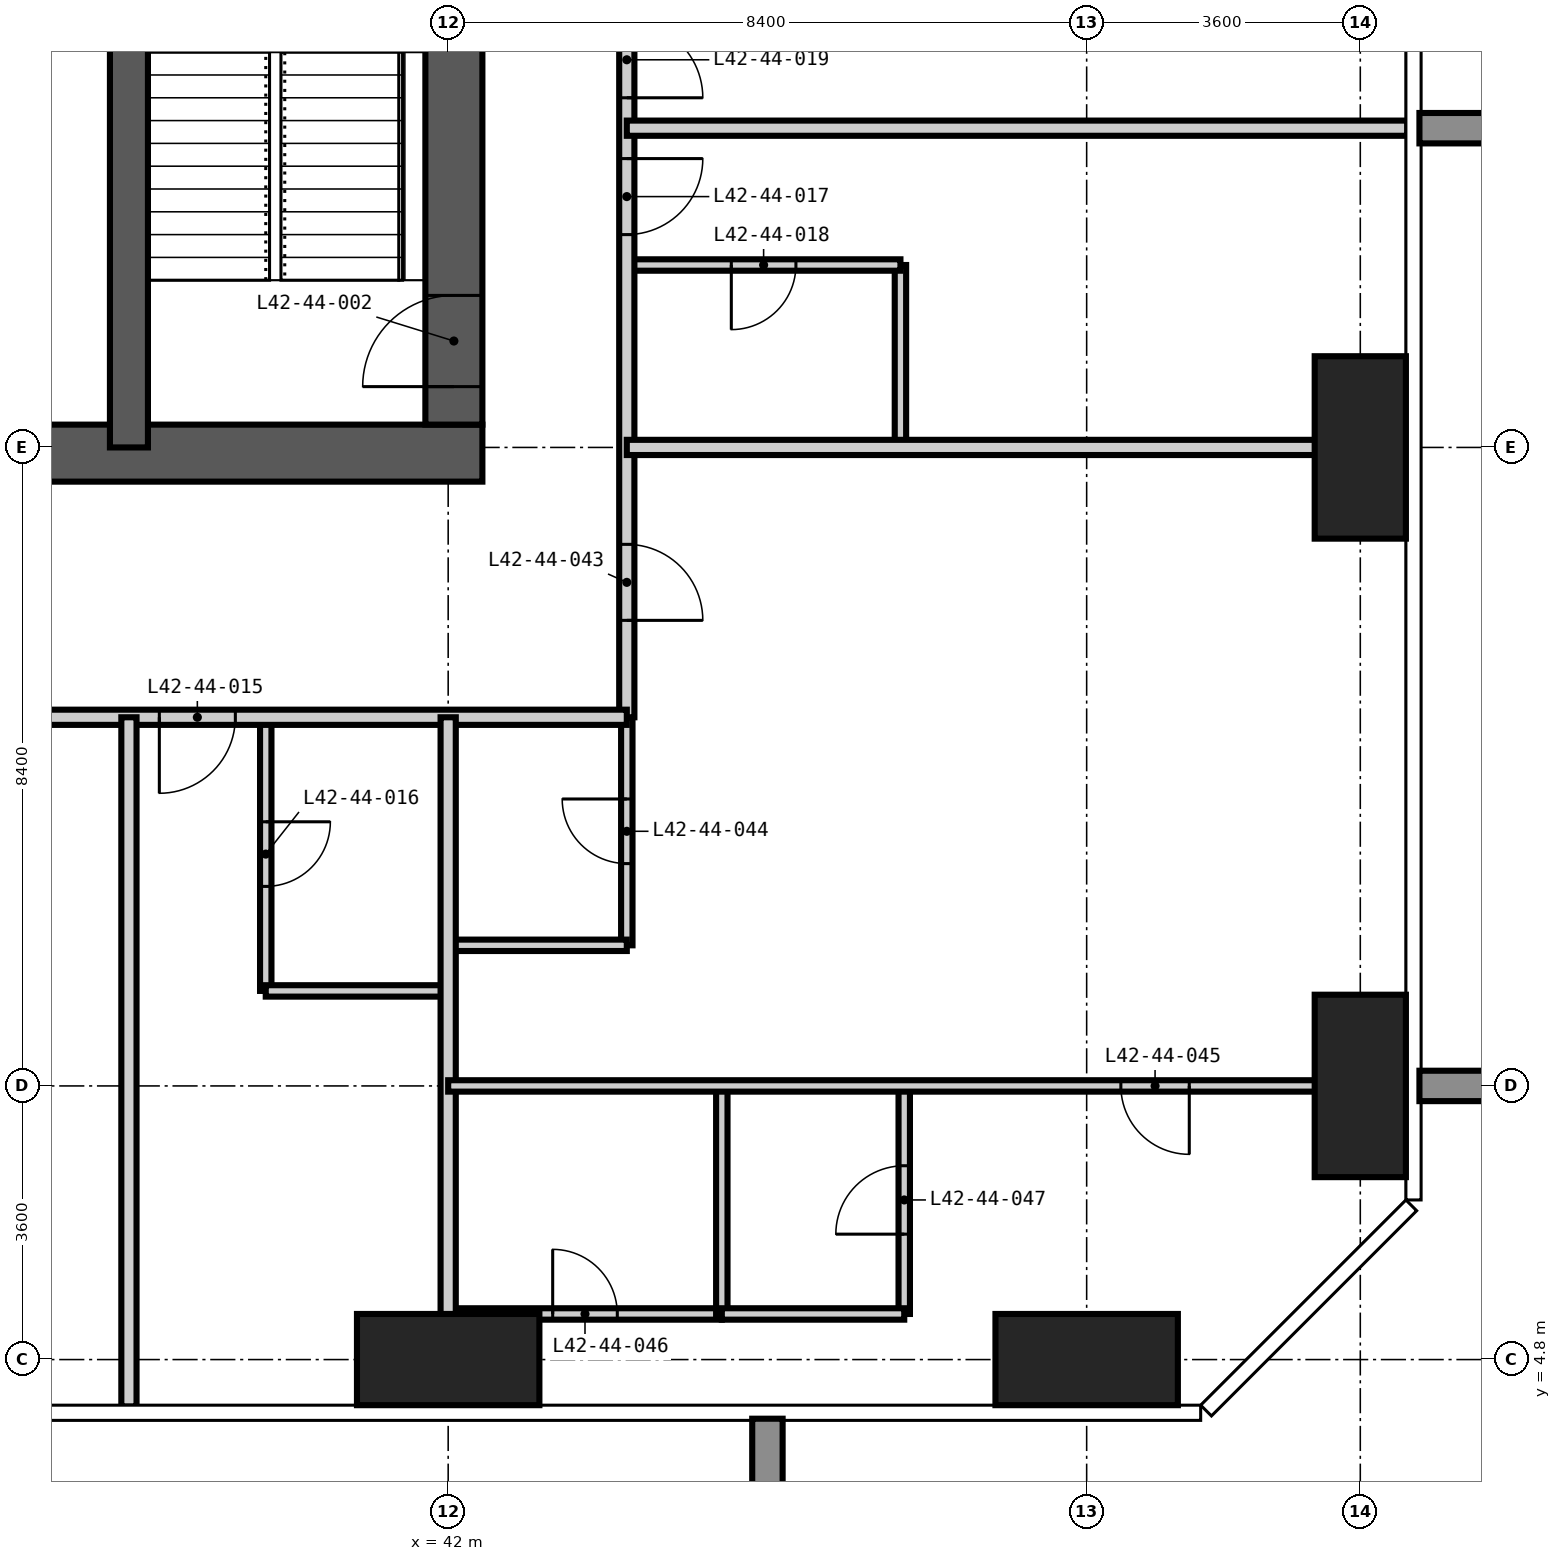
"""IFC4 building model, lengths in metres.
Left out: names, types, materials, properties, quantities, classifications, styles, units other than length and angle.
Written with IfcOpenShell. Run it as: python <this file> out.ifc"""

import sys

from ifc_helpers import new_model, si_unit, direction, frame, frame_2d, origin, origin_2d, place, context, subcontext, project, spatial, rectangle, extrude, element, fill, save


model = new_model("IFC4")
c1 = context("Model", 3, precision=1e-05, world=origin(), true_north=direction((0.0, 1.0)))
c2 = subcontext(c1, "Body", "Model", "MODEL_VIEW")
j1 = project(units=[si_unit("LENGTHUNIT", "METRE"), si_unit("PLANEANGLEUNIT", "RADIAN")], contexts=[c1])
p1 = place(None, origin())
s1 = spatial("IfcSite", under=j1, at=p1, CompositionType="ELEMENT")
p2 = place(p1, origin())
s2 = spatial("IfcBuilding", under=s1, at=p2, CompositionType="ELEMENT")
p3 = place(p2, frame((0.0, 0.0, 166.2)))
s3 = spatial("IfcBuildingStorey", under=s2, at=p3, CompositionType="ELEMENT", Elevation=166.2)
for number, where, z_axis, x_axis in (
    (1, (42.0, 4.8, -0.35), (0.0, 0.0, 1.0), (1.0, 0.0, 0.0)),
    (2, (50.4, 4.8, -0.35), (0.0, 0.0, 1.0), (1.0, 0.0, 0.0)),
):
    element("IfcColumn", number, at=place(p3, frame(where, z_axis=z_axis, x_axis=x_axis)), inside=s3, PredefinedType="COLUMN", context=c2, shape_type="SweptSolid", body=[
        extrude(rectangle(XDim=2.4, YDim=1.2, at=origin_2d()), origin(), (0.0, 0.0, 1.0), 3.6),
    ])
for number, where, z_axis, x_axis in (
    (3, (54.0, 8.4, -0.35), (0.0, 0.0, 1.0), (1.0, 0.0, 0.0)),
    (4, (54.0, 16.8, -0.35), (0.0, 0.0, 1.0), (1.0, 0.0, 0.0)),
):
    element("IfcColumn", number, at=place(p3, frame(where, z_axis=z_axis, x_axis=x_axis)), inside=s3, PredefinedType="COLUMN", context=c2, shape_type="SweptSolid", body=[
        extrude(rectangle(XDim=1.2, YDim=2.4, at=origin_2d()), origin(), (0.0, 0.0, 1.0), 3.6),
    ])
p4 = place(p3, frame((16.35, 16.725, -0.35), z_axis=(0.0, 0.0, 1.0), x_axis=(1.0, 0.0, 0.0)))
e5 = element("IfcWall", 5, at=p4, inside=s3, PredefinedType="SHEAR", context=c2, shape_type="SweptSolid", body=[
    extrude(rectangle(XDim=26.1, YDim=0.75, at=frame_2d((13.05, 0.0))), origin(), (0.0, 0.0, 1.0), 3.6),
])
p5 = place(p4, frame((12.55, 0.0, 0.35)))
e6 = element("IfcOpeningElement", 6, at=p5, cuts=e5, PredefinedType="OPENING", context=c2, shape_type="SweptSolid", body=[
    extrude(rectangle(XDim=1.0, YDim=2.1, at=frame_2d((0.5, 1.05))), frame((0.0, 0.385, 0.0), z_axis=(0.0, -1.0, 0.0), x_axis=(1.0, 0.0, 0.0)), (0.0, 0.0, 1.0), 0.77),
])
p6 = place(p4, frame((18.85, 0.0, 0.35)))
e7 = element("IfcOpeningElement", 7, at=p6, cuts=e5, PredefinedType="OPENING", context=c2, shape_type="SweptSolid", body=[
    extrude(rectangle(XDim=1.0, YDim=2.1, at=frame_2d((0.5, 1.05))), frame((0.0, 0.385, 0.0), z_axis=(0.0, -1.0, 0.0), x_axis=(1.0, 0.0, 0.0)), (0.0, 0.0, 1.0), 0.77),
])
p7 = place(p3, frame((42.075, 17.1, -0.35), z_axis=(0.0, 0.0, 1.0), x_axis=(0.0, 1.0, 0.0)))
e8 = element("IfcWall", 8, at=p7, inside=s3, PredefinedType="SHEAR", context=c2, shape_type="SweptSolid", body=[
    extrude(rectangle(XDim=24.6, YDim=0.75, at=frame_2d((12.3, 0.0))), origin(), (0.0, 0.0, 1.0), 3.6),
])
p8 = place(p7, frame((0.5, 0.0, 0.35)))
e9 = element("IfcOpeningElement", 9, at=p8, cuts=e8, PredefinedType="OPENING", context=c2, shape_type="SweptSolid", body=[
    extrude(rectangle(XDim=1.2, YDim=2.2, at=frame_2d((0.6, 1.1))), frame((0.0, 0.385, 0.0), z_axis=(0.0, -1.0, 0.0), x_axis=(1.0, 0.0, 0.0)), (0.0, 0.0, 1.0), 0.77),
])
p9 = place(p7, frame((11.8, 0.0, 0.35)))
e10 = element("IfcOpeningElement", 10, at=p9, cuts=e8, PredefinedType="OPENING", context=c2, shape_type="SweptSolid", body=[
    extrude(rectangle(XDim=1.0, YDim=2.1, at=frame_2d((0.5, 1.05))), frame((0.0, 0.385, 0.0), z_axis=(0.0, -1.0, 0.0), x_axis=(1.0, 0.0, 0.0)), (0.0, 0.0, 1.0), 0.77),
])
p10 = place(p7, frame((20.2, 0.0, 0.35)))
e11 = element("IfcOpeningElement", 11, at=p10, cuts=e8, PredefinedType="OPENING", context=c2, shape_type="SweptSolid", body=[
    extrude(rectangle(XDim=1.0, YDim=2.1, at=frame_2d((0.5, 1.05))), frame((0.0, 0.385, 0.0), z_axis=(0.0, -1.0, 0.0), x_axis=(1.0, 0.0, 0.0)), (0.0, 0.0, 1.0), 0.77),
])
p11 = place(p3, frame((37.8, 16.8, -0.35), z_axis=(0.0, 0.0, 1.0), x_axis=(0.0, 1.0, 0.0)))
e12 = element("IfcWall", 12, at=p11, inside=s3, PredefinedType="SHEAR", context=c2, shape_type="SweptSolid", body=[
    extrude(rectangle(XDim=11.2, YDim=0.5, at=frame_2d((5.6, 0.0))), origin(), (0.0, 0.0, 1.0), 3.6),
])
p12 = place(p3, frame((39.6, 9.65, 0.0), z_axis=(0.0, 0.0, 1.0), x_axis=(0.0, 1.0, 0.0)))
e13 = element("IfcWall", 13, at=p12, inside=s3, PredefinedType="PARTITIONING", context=c2, shape_type="SweptSolid", body=[
    extrude(rectangle(XDim=3.6, YDim=0.15, at=frame_2d((1.8, 0.0))), origin(), (0.0, 0.0, 1.0), 3.25),
])
p13 = place(p12, frame((1.375, 0.0, 0.0)))
e14 = element("IfcOpeningElement", 14, at=p13, cuts=e13, PredefinedType="OPENING", context=c2, shape_type="SweptSolid", body=[
    extrude(rectangle(XDim=0.85, YDim=2.1, at=frame_2d((0.425, 1.05))), frame((0.0, 0.085, 0.0), z_axis=(0.0, -1.0, 0.0), x_axis=(1.0, 0.0, 0.0)), (0.0, 0.0, 1.0), 0.17),
])
p14 = place(p3, frame((44.35, 10.25, 0.0), z_axis=(0.0, 0.0, 1.0), x_axis=(0.0, 1.0, 0.0)))
e15 = element("IfcWall", 15, at=p14, inside=s3, PredefinedType="PARTITIONING", context=c2, shape_type="SweptSolid", body=[
    extrude(rectangle(XDim=3.0, YDim=0.15, at=frame_2d((1.5, 0.0))), origin(), (0.0, 0.0, 1.0), 3.25),
])
p15 = place(p14, frame((1.075, 0.0, 0.0)))
e16 = element("IfcOpeningElement", 16, at=p15, cuts=e15, PredefinedType="OPENING", context=c2, shape_type="SweptSolid", body=[
    extrude(rectangle(XDim=0.85, YDim=2.1, at=frame_2d((0.425, 1.05))), frame((0.0, 0.085, 0.0), z_axis=(0.0, -1.0, 0.0), x_axis=(1.0, 0.0, 0.0)), (0.0, 0.0, 1.0), 0.17),
])
p16 = place(p3, frame((47.95, 16.8, 0.0), z_axis=(0.0, 0.0, 1.0), x_axis=(0.0, 1.0, 0.0)))
e17 = element("IfcWall", 17, at=p16, inside=s3, PredefinedType="PARTITIONING", context=c2, shape_type="SweptSolid", body=[
    extrude(rectangle(XDim=2.4, YDim=0.15, at=frame_2d((1.2, 0.0))), origin(), (0.0, 0.0, 1.0), 3.25),
])
p17 = place(p3, frame((42.0, 5.4, 0.0), z_axis=(0.0, 0.0, 1.0), x_axis=(1.0, 0.0, 0.0)))
e18 = element("IfcWall", 18, at=p17, inside=s3, PredefinedType="PARTITIONING", context=c2, shape_type="SweptSolid", body=[
    extrude(rectangle(XDim=3.6, YDim=0.15, at=frame_2d((1.8, 0.0))), origin(), (0.0, 0.0, 1.0), 3.25),
])
p18 = place(p17, frame((1.375, 0.0, 0.0)))
e19 = element("IfcOpeningElement", 19, at=p18, cuts=e18, PredefinedType="OPENING", context=c2, shape_type="SweptSolid", body=[
    extrude(rectangle(XDim=0.85, YDim=2.1, at=frame_2d((0.425, 1.05))), frame((0.0, 0.085, 0.0), z_axis=(0.0, -1.0, 0.0), x_axis=(1.0, 0.0, 0.0)), (0.0, 0.0, 1.0), 0.17),
])
p19 = place(p3, frame((39.6, 9.65, 0.0), z_axis=(0.0, 0.0, 1.0), x_axis=(1.0, 0.0, 0.0)))
e20 = element("IfcWall", 20, at=p19, inside=s3, PredefinedType="PARTITIONING", context=c2, shape_type="SweptSolid", body=[
    extrude(rectangle(XDim=2.4, YDim=0.15, at=frame_2d((1.2, 0.0))), origin(), (0.0, 0.0, 1.0), 3.25),
])
p20 = place(p3, frame((42.0, 10.25, 0.0), z_axis=(0.0, 0.0, 1.0), x_axis=(1.0, 0.0, 0.0)))
e21 = element("IfcWall", 21, at=p20, inside=s3, PredefinedType="PARTITIONING", context=c2, shape_type="SweptSolid", body=[
    extrude(rectangle(XDim=2.35, YDim=0.15, at=frame_2d((1.175, 0.0))), origin(), (0.0, 0.0, 1.0), 3.25),
])
p21 = place(p3, frame((44.35, 19.2, 0.0), z_axis=(0.0, 0.0, 1.0), x_axis=(1.0, 0.0, 0.0)))
e22 = element("IfcWall", 22, at=p21, inside=s3, PredefinedType="PARTITIONING", context=c2, shape_type="SweptSolid", body=[
    extrude(rectangle(XDim=3.6, YDim=0.15, at=frame_2d((1.8, 0.0))), origin(), (0.0, 0.0, 1.0), 3.25),
])
p22 = place(p21, frame((1.375, 0.0, 0.0)))
e23 = element("IfcOpeningElement", 23, at=p22, cuts=e22, PredefinedType="OPENING", context=c2, shape_type="SweptSolid", body=[
    extrude(rectangle(XDim=0.85, YDim=2.1, at=frame_2d((0.425, 1.05))), frame((0.0, 0.085, 0.0), z_axis=(0.0, -1.0, 0.0), x_axis=(1.0, 0.0, 0.0)), (0.0, 0.0, 1.0), 0.17),
])
p23 = place(p3, frame((44.35, 25.2, 0.0), z_axis=(0.0, 0.0, 1.0), x_axis=(0.0, -1.0, 0.0)))
e24 = element("IfcWall", 24, at=p23, inside=s3, PredefinedType="PARTITIONING", context=c2, shape_type="SweptSolid", body=[
    extrude(rectangle(XDim=11.95, YDim=0.2, at=frame_2d((5.975, 0.0))), origin(), (0.0, 0.0, 1.0), 3.25),
])
p24 = place(p23, frame((4.6, 0.0, 0.0)))
e25 = element("IfcOpeningElement", 25, at=p24, cuts=e24, PredefinedType="OPENING", context=c2, shape_type="SweptSolid", body=[
    extrude(rectangle(XDim=1.0, YDim=2.2, at=frame_2d((0.5, 1.1))), frame((0.0, 0.11, 0.0), z_axis=(0.0, -1.0, 0.0), x_axis=(1.0, 0.0, 0.0)), (0.0, 0.0, 1.0), 0.22),
])
p25 = place(p23, frame((2.8, 0.0, 0.0)))
e26 = element("IfcOpeningElement", 26, at=p25, cuts=e24, PredefinedType="OPENING", context=c2, shape_type="SweptSolid", body=[
    extrude(rectangle(XDim=1.0, YDim=2.2, at=frame_2d((0.5, 1.1))), frame((0.0, 0.11, 0.0), z_axis=(0.0, -1.0, 0.0), x_axis=(1.0, 0.0, 0.0)), (0.0, 0.0, 1.0), 0.22),
])
p26 = place(p23, frame((9.675, 0.0, 0.0)))
e27 = element("IfcOpeningElement", 27, at=p26, cuts=e24, PredefinedType="OPENING", context=c2, shape_type="SweptSolid", body=[
    extrude(rectangle(XDim=1.0, YDim=2.2, at=frame_2d((0.5, 1.1))), frame((0.0, 0.11, 0.0), z_axis=(0.0, -1.0, 0.0), x_axis=(1.0, 0.0, 0.0)), (0.0, 0.0, 1.0), 0.22),
])
p27 = place(p3, frame((44.35, 13.25, 0.0), z_axis=(0.0, 0.0, 1.0), x_axis=(-1.0, 0.0, 0.0)))
e28 = element("IfcWall", 28, at=p27, inside=s3, PredefinedType="PARTITIONING", context=c2, shape_type="SweptSolid", body=[
    extrude(rectangle(XDim=31.1, YDim=0.2, at=frame_2d((15.55, 0.0))), origin(), (0.0, 0.0, 1.0), 3.25),
])
p28 = place(p27, frame((23.75, 0.0, 0.0)))
e29 = element("IfcOpeningElement", 29, at=p28, cuts=e28, PredefinedType="OPENING", context=c2, shape_type="SweptSolid", body=[
    extrude(rectangle(XDim=1.0, YDim=2.2, at=frame_2d((0.5, 1.1))), frame((0.0, 0.11, 0.0), z_axis=(0.0, -1.0, 0.0), x_axis=(1.0, 0.0, 0.0)), (0.0, 0.0, 1.0), 0.22),
])
p29 = place(p27, frame((20.0, 0.0, 0.0)))
e30 = element("IfcOpeningElement", 30, at=p29, cuts=e28, PredefinedType="OPENING", context=c2, shape_type="SweptSolid", body=[
    extrude(rectangle(XDim=1.0, YDim=2.2, at=frame_2d((0.5, 1.1))), frame((0.0, 0.11, 0.0), z_axis=(0.0, -1.0, 0.0), x_axis=(1.0, 0.0, 0.0)), (0.0, 0.0, 1.0), 0.22),
])
p30 = place(p27, frame((8.9, 0.0, 0.0)))
e31 = element("IfcOpeningElement", 31, at=p30, cuts=e28, PredefinedType="OPENING", context=c2, shape_type="SweptSolid", body=[
    extrude(rectangle(XDim=1.0, YDim=2.2, at=frame_2d((0.5, 1.1))), frame((0.0, 0.11, 0.0), z_axis=(0.0, -1.0, 0.0), x_axis=(1.0, 0.0, 0.0)), (0.0, 0.0, 1.0), 0.22),
])
p31 = place(p27, frame((5.15, 0.0, 0.0)))
e32 = element("IfcOpeningElement", 32, at=p31, cuts=e28, PredefinedType="OPENING", context=c2, shape_type="SweptSolid", body=[
    extrude(rectangle(XDim=1.0, YDim=2.2, at=frame_2d((0.5, 1.1))), frame((0.0, 0.11, 0.0), z_axis=(0.0, -1.0, 0.0), x_axis=(1.0, 0.0, 0.0)), (0.0, 0.0, 1.0), 0.22),
])
for number, where, z_axis, x_axis in (
    (33, (37.8, 4.182, 0.0), (0.0, 0.0, 1.0), (0.0, 1.0, 0.0)),
    (34, (42.0, 4.182, 0.0), (0.0, 0.0, 1.0), (0.0, 1.0, 0.0)),
):
    element("IfcWall", number, at=place(p3, frame(where, z_axis=z_axis, x_axis=x_axis)), inside=s3, PredefinedType="PARTITIONING", context=c2, shape_type="SweptSolid", body=[
        extrude(rectangle(XDim=9.068, YDim=0.2, at=frame_2d((4.534, 0.0))), origin(), (0.0, 0.0, 1.0), 3.25),
    ])
for number, where, z_axis, x_axis in (
    (35, (44.35, 16.8, 0.0), (0.0, 0.0, 1.0), (1.0, 0.0, 0.0)),
    (36, (44.35, 21.0, 0.0), (0.0, 0.0, 1.0), (1.0, 0.0, 0.0)),
):
    element("IfcWall", number, at=place(p3, frame(where, z_axis=z_axis, x_axis=x_axis)), inside=s3, PredefinedType="PARTITIONING", context=c2, shape_type="SweptSolid", body=[
        extrude(rectangle(XDim=10.268, YDim=0.2, at=frame_2d((5.134, 0.0))), origin(), (0.0, 0.0, 1.0), 3.25),
    ])
p32 = place(p3, frame((45.6, 5.4, 0.0), z_axis=(0.0, 0.0, 1.0), x_axis=(0.0, 1.0, 0.0)))
e37 = element("IfcWall", 37, at=p32, inside=s3, PredefinedType="PARTITIONING", context=c2, shape_type="SweptSolid", body=[
    extrude(rectangle(XDim=3.0, YDim=0.15, at=frame_2d((1.5, 0.0))), origin(), (0.0, 0.0, 1.0), 3.25),
])
p33 = place(p3, frame((48.0, 5.4, 0.0), z_axis=(0.0, 0.0, 1.0), x_axis=(0.0, 1.0, 0.0)))
e38 = element("IfcWall", 38, at=p33, inside=s3, PredefinedType="PARTITIONING", context=c2, shape_type="SweptSolid", body=[
    extrude(rectangle(XDim=3.0, YDim=0.15, at=frame_2d((1.5, 0.0))), origin(), (0.0, 0.0, 1.0), 3.25),
])
p34 = place(p33, frame((1.05, 0.0, 0.0)))
e39 = element("IfcOpeningElement", 39, at=p34, cuts=e38, PredefinedType="OPENING", context=c2, shape_type="SweptSolid", body=[
    extrude(rectangle(XDim=0.9, YDim=2.1, at=frame_2d((0.45, 1.05))), frame((0.0, 0.085, 0.0), z_axis=(0.0, -1.0, 0.0), x_axis=(1.0, 0.0, 0.0)), (0.0, 0.0, 1.0), 0.17),
])
p35 = place(p3, frame((45.6, 5.4, 0.0), z_axis=(0.0, 0.0, 1.0), x_axis=(1.0, 0.0, 0.0)))
e40 = element("IfcWall", 40, at=p35, inside=s3, PredefinedType="PARTITIONING", context=c2, shape_type="SweptSolid", body=[
    extrude(rectangle(XDim=2.4, YDim=0.15, at=frame_2d((1.2, 0.0))), origin(), (0.0, 0.0, 1.0), 3.25),
])
p36 = place(p3, frame((42.0, 8.4, 0.0), z_axis=(0.0, 0.0, 1.0), x_axis=(1.0, 0.0, 0.0)))
e41 = element("IfcWall", 41, at=p36, inside=s3, PredefinedType="PARTITIONING", context=c2, shape_type="SweptSolid", body=[
    extrude(rectangle(XDim=12.618, YDim=0.15, at=frame_2d((6.309, 0.0))), origin(), (0.0, 0.0, 1.0), 3.25),
])
p37 = place(p36, frame((8.85, 0.0, 0.0)))
e42 = element("IfcOpeningElement", 42, at=p37, cuts=e41, PredefinedType="OPENING", context=c2, shape_type="SweptSolid", body=[
    extrude(rectangle(XDim=0.9, YDim=2.1, at=frame_2d((0.45, 1.05))), frame((0.0, 0.085, 0.0), z_axis=(0.0, -1.0, 0.0), x_axis=(1.0, 0.0, 0.0)), (0.0, 0.0, 1.0), 0.17),
])
p38 = place(p8, origin())
e43 = element("IfcDoor", 43, at=p38, inside=s3, OperationType="SINGLE_SWING_LEFT", PredefinedType="DOOR", context=c2, shape_type="SweptSolid", body=[
    extrude(rectangle(XDim=1.2, YDim=2.2, at=frame_2d((0.6, 1.1))), frame((0.0, 0.025, 0.0), z_axis=(0.0, -1.0, 0.0), x_axis=(1.0, 0.0, 0.0)), (0.0, 0.0, 1.0), 0.05),
])
fill(e9, e43)
p39 = place(p31, origin())
e44 = element("IfcDoor", 44, at=p39, inside=s3, OperationType="SINGLE_SWING_RIGHT", PredefinedType="DOOR", context=c2, shape_type="SweptSolid", body=[
    extrude(rectangle(XDim=1.0, YDim=2.2, at=frame_2d((0.5, 1.1))), frame((0.0, 0.025, 0.0), z_axis=(0.0, -1.0, 0.0), x_axis=(1.0, 0.0, 0.0)), (0.0, 0.0, 1.0), 0.05),
])
fill(e32, e44)
p40 = place(p13, frame((0.85, 0.0, 0.0), z_axis=(0.0, 0.0, 1.0), x_axis=(-1.0, 0.0, 0.0)))
e45 = element("IfcDoor", 45, at=p40, inside=s3, OperationType="SINGLE_SWING_LEFT", PredefinedType="DOOR", context=c2, shape_type="SweptSolid", body=[
    extrude(rectangle(XDim=0.85, YDim=2.1, at=frame_2d((0.425, 1.05))), frame((0.0, 0.025, 0.0), z_axis=(0.0, -1.0, 0.0), x_axis=(1.0, 0.0, 0.0)), (0.0, 0.0, 1.0), 0.05),
])
fill(e14, e45)
p41 = place(p24, origin())
e46 = element("IfcDoor", 46, at=p41, inside=s3, OperationType="SINGLE_SWING_LEFT", PredefinedType="DOOR", context=c2, shape_type="SweptSolid", body=[
    extrude(rectangle(XDim=1.0, YDim=2.2, at=frame_2d((0.5, 1.1))), frame((0.0, 0.025, 0.0), z_axis=(0.0, -1.0, 0.0), x_axis=(1.0, 0.0, 0.0)), (0.0, 0.0, 1.0), 0.05),
])
fill(e25, e46)
p42 = place(p22, frame((0.85, 0.0, 0.0), z_axis=(0.0, 0.0, 1.0), x_axis=(-1.0, 0.0, 0.0)))
e47 = element("IfcDoor", 47, at=p42, inside=s3, OperationType="SINGLE_SWING_RIGHT", PredefinedType="DOOR", context=c2, shape_type="SweptSolid", body=[
    extrude(rectangle(XDim=0.85, YDim=2.1, at=frame_2d((0.425, 1.05))), frame((0.0, 0.025, 0.0), z_axis=(0.0, -1.0, 0.0), x_axis=(1.0, 0.0, 0.0)), (0.0, 0.0, 1.0), 0.05),
])
fill(e23, e47)
p43 = place(p25, origin())
e48 = element("IfcDoor", 48, at=p43, inside=s3, OperationType="SINGLE_SWING_RIGHT", PredefinedType="DOOR", context=c2, shape_type="SweptSolid", body=[
    extrude(rectangle(XDim=1.0, YDim=2.2, at=frame_2d((0.5, 1.1))), frame((0.0, 0.025, 0.0), z_axis=(0.0, -1.0, 0.0), x_axis=(1.0, 0.0, 0.0)), (0.0, 0.0, 1.0), 0.05),
])
fill(e26, e48)
p44 = place(p26, origin())
e49 = element("IfcDoor", 49, at=p44, inside=s3, OperationType="SINGLE_SWING_RIGHT", PredefinedType="DOOR", context=c2, shape_type="SweptSolid", body=[
    extrude(rectangle(XDim=1.0, YDim=2.2, at=frame_2d((0.5, 1.1))), frame((0.0, 0.025, 0.0), z_axis=(0.0, -1.0, 0.0), x_axis=(1.0, 0.0, 0.0)), (0.0, 0.0, 1.0), 0.05),
])
fill(e27, e49)
p45 = place(p15, origin())
e50 = element("IfcDoor", 50, at=p45, inside=s3, OperationType="SINGLE_SWING_RIGHT", PredefinedType="DOOR", context=c2, shape_type="SweptSolid", body=[
    extrude(rectangle(XDim=0.85, YDim=2.1, at=frame_2d((0.425, 1.05))), frame((0.0, 0.025, 0.0), z_axis=(0.0, -1.0, 0.0), x_axis=(1.0, 0.0, 0.0)), (0.0, 0.0, 1.0), 0.05),
])
fill(e16, e50)
p46 = place(p37, frame((0.9, 0.0, 0.0), z_axis=(0.0, 0.0, 1.0), x_axis=(-1.0, 0.0, 0.0)))
e51 = element("IfcDoor", 51, at=p46, inside=s3, OperationType="SINGLE_SWING_LEFT", PredefinedType="DOOR", context=c2, shape_type="SweptSolid", body=[
    extrude(rectangle(XDim=0.9, YDim=2.1, at=frame_2d((0.45, 1.05))), frame((0.0, 0.025, 0.0), z_axis=(0.0, -1.0, 0.0), x_axis=(1.0, 0.0, 0.0)), (0.0, 0.0, 1.0), 0.05),
])
fill(e42, e51)
p47 = place(p18, origin())
e52 = element("IfcDoor", 52, at=p47, inside=s3, OperationType="SINGLE_SWING_LEFT", PredefinedType="DOOR", context=c2, shape_type="SweptSolid", body=[
    extrude(rectangle(XDim=0.85, YDim=2.1, at=frame_2d((0.425, 1.05))), frame((0.0, 0.025, 0.0), z_axis=(0.0, -1.0, 0.0), x_axis=(1.0, 0.0, 0.0)), (0.0, 0.0, 1.0), 0.05),
])
fill(e19, e52)
p48 = place(p34, origin())
e53 = element("IfcDoor", 53, at=p48, inside=s3, OperationType="SINGLE_SWING_LEFT", PredefinedType="DOOR", context=c2, shape_type="SweptSolid", body=[
    extrude(rectangle(XDim=0.9, YDim=2.1, at=frame_2d((0.45, 1.05))), frame((0.0, 0.025, 0.0), z_axis=(0.0, -1.0, 0.0), x_axis=(1.0, 0.0, 0.0)), (0.0, 0.0, 1.0), 0.05),
])
fill(e39, e53)
save(model, sys.argv[1])
